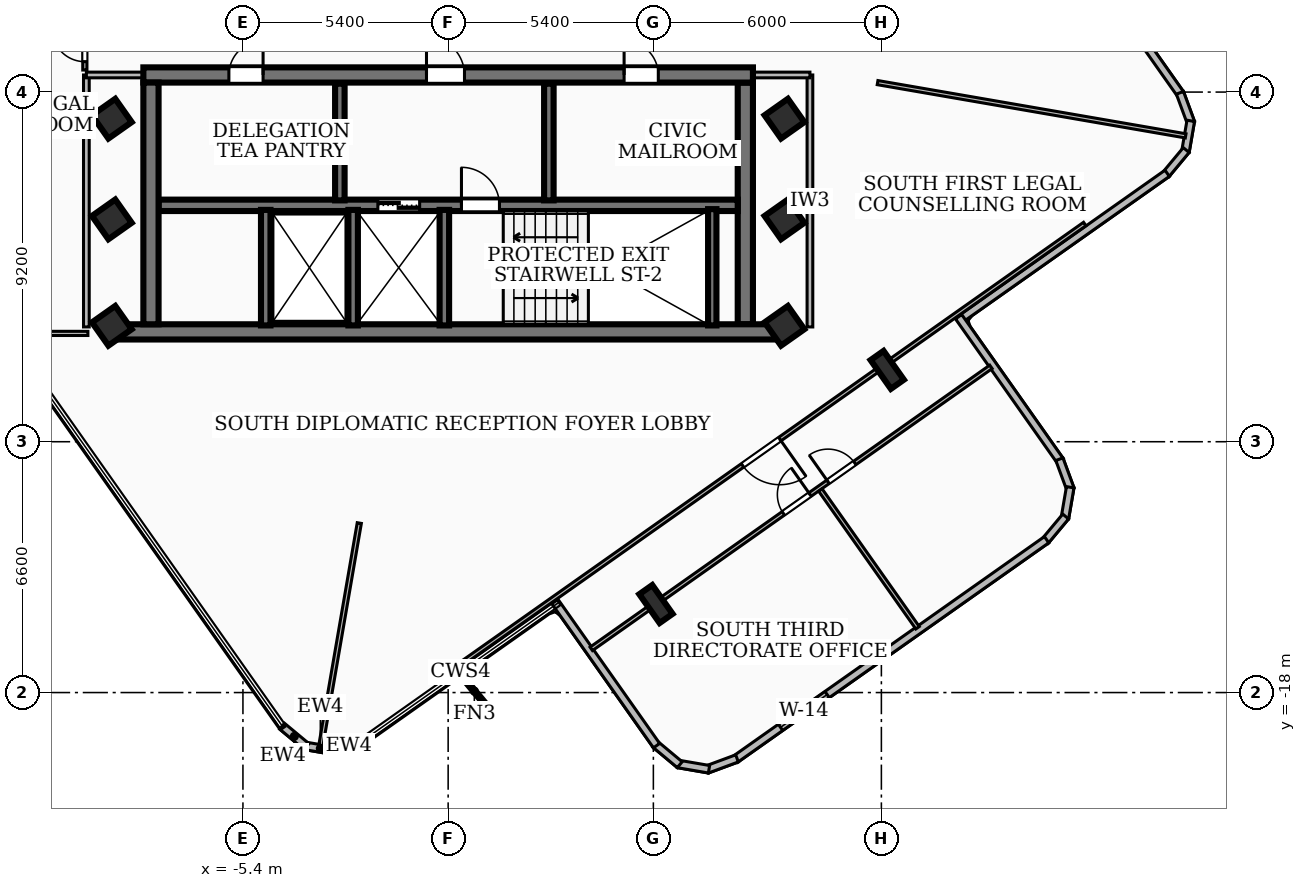
"""IFC4 building model, lengths in metres.
Left out: names, types, materials, properties, quantities, classifications, styles, units other than length and angle.
Written with IfcOpenShell. Run it as: python <this file> out.ifc"""

import sys

from ifc_helpers import new_model, si_unit, direction, frame, frame_2d, origin, origin_2d, place, context, subcontext, project, spatial, rectangle, i_section, extrude, element, fill, save


model = new_model("IFC4")
c1 = context("Model", 3, precision=1e-05, world=origin(), true_north=direction((0.0, 1.0)))
c2 = subcontext(c1, "Body", "Model", "MODEL_VIEW")
j1 = project(units=[si_unit("LENGTHUNIT", "METRE"), si_unit("PLANEANGLEUNIT", "RADIAN")], contexts=[c1])
p1 = place(None, origin())
s1 = spatial("IfcSite", under=j1, at=p1, CompositionType="ELEMENT")
p2 = place(p1, origin())
s2 = spatial("IfcBuilding", under=s1, at=p2, CompositionType="ELEMENT")
p3 = place(p2, frame((0.0, 0.0, 222.3)))
s3 = spatial("IfcBuildingStorey", under=s2, at=p3, CompositionType="ELEMENT", Elevation=222.3)
p4 = place(p3, frame((8.78, -8.51, 0.0), z_axis=(0.0, 0.0, 1.0), x_axis=(-1.0, 0.0, 0.0)))
e1 = element("IfcWall", 1, at=p4, inside=s3, PredefinedType="SHEAR", context=c2, shape_type="SweptSolid", body=[
    extrude(rectangle(XDim=17.56, YDim=0.4, at=frame_2d((8.78, 0.0))), origin(), (0.0, 0.0, 1.0), 3.14),
])
p5 = place(p3, frame((-8.02, -1.75, 0.0), z_axis=(0.0, 0.0, 1.0), x_axis=(1.0, 0.0, 0.0)))
e2 = element("IfcWall", 2, at=p5, inside=s3, PredefinedType="SHEAR", context=c2, shape_type="SweptSolid", body=[
    extrude(rectangle(XDim=16.04, YDim=0.4, at=frame_2d((8.02, 0.0))), origin(), (0.0, 0.0, 1.0), 3.14),
])
p6 = place(p5, frame((7.45, 0.0, 0.0)))
e3 = element("IfcOpeningElement", 3, at=p6, cuts=e2, PredefinedType="OPENING", context=c2, shape_type="SweptSolid", body=[
    extrude(rectangle(XDim=1.0, YDim=2.1, at=frame_2d((0.5, 1.05))), frame((0.0, 0.21, 0.0), z_axis=(0.0, -1.0, 0.0), x_axis=(1.0, 0.0, 0.0)), (0.0, 0.0, 1.0), 0.42),
])
p7 = place(p5, frame((12.65, 0.0, 0.0)))
e4 = element("IfcOpeningElement", 4, at=p7, cuts=e2, PredefinedType="OPENING", context=c2, shape_type="SweptSolid", body=[
    extrude(rectangle(XDim=0.9, YDim=2.06, at=frame_2d((0.45, 1.03))), frame((0.0, 0.21, 0.0), z_axis=(0.0, -1.0, 0.0), x_axis=(1.0, 0.0, 0.0)), (0.0, 0.0, 1.0), 0.42),
])
p8 = place(p5, frame((2.25, 0.0, 0.0)))
e5 = element("IfcOpeningElement", 5, at=p8, cuts=e2, PredefinedType="OPENING", context=c2, shape_type="SweptSolid", body=[
    extrude(rectangle(XDim=0.9, YDim=2.06, at=frame_2d((0.45, 1.03))), frame((0.0, 0.21, 0.0), z_axis=(0.0, -1.0, 0.0), x_axis=(1.0, 0.0, 0.0)), (0.0, 0.0, 1.0), 0.42),
])
for number, where, z_axis, x_axis in (
    (6, (-7.82, -8.31, 0.0), (0.0, 0.0, 1.0), (0.0, 1.0, 0.0)),
    (7, (7.82, -1.95, 0.0), (0.0, 0.0, 1.0), (0.0, -1.0, 0.0)),
):
    element("IfcWall", number, at=place(p3, frame(where, z_axis=z_axis, x_axis=x_axis)), inside=s3, PredefinedType="SHEAR", context=c2, shape_type="SweptSolid", body=[
        extrude(rectangle(XDim=6.36, YDim=0.4, at=frame_2d((3.18, 0.0))), origin(), (0.0, 0.0, 1.0), 3.14),
    ])
p9 = place(p3, frame((-7.62, -5.18, 0.0), z_axis=(0.0, 0.0, 1.0), x_axis=(1.0, 0.0, 0.0)))
e8 = element("IfcWall", 8, at=p9, inside=s3, PredefinedType="SOLIDWALL", context=c2, shape_type="SweptSolid", body=[
    extrude(rectangle(XDim=15.24, YDim=0.3, at=frame_2d((7.62, 0.0))), origin(), (0.0, 0.0, 1.0), 3.14),
])
p10 = place(p9, frame((5.77, 0.0, 0.0)))
e9 = element("IfcOpeningElement", 9, at=p10, cuts=e8, PredefinedType="OPENING", context=c2, shape_type="SweptSolid", body=[
    extrude(rectangle(XDim=1.1, YDim=2.15, at=frame_2d((0.55, 1.075))), frame((0.0, 0.16, 0.0), z_axis=(0.0, -1.0, 0.0), x_axis=(1.0, 0.0, 0.0)), (0.0, 0.0, 1.0), 0.32),
])
p11 = place(p9, frame((7.97, 0.0, 0.0)))
e10 = element("IfcOpeningElement", 10, at=p11, cuts=e8, PredefinedType="OPENING", context=c2, shape_type="SweptSolid", body=[
    extrude(rectangle(XDim=1.0, YDim=2.1, at=frame_2d((0.5, 1.05))), frame((0.0, 0.16, 0.0), z_axis=(0.0, -1.0, 0.0), x_axis=(1.0, 0.0, 0.0)), (0.0, 0.0, 1.0), 0.32),
])
p12 = place(p3, frame((6.95, -8.34, 0.0), z_axis=(0.0, 0.0, 1.0), x_axis=(0.0, 1.0, 0.0)))
e11 = element("IfcWall", 11, at=p12, inside=s3, PredefinedType="SOLIDWALL", context=c2, shape_type="SweptSolid", body=[
    extrude(rectangle(XDim=3.06, YDim=0.22, at=frame_2d((1.53, 0.0))), origin(), (0.0, 0.0, 1.0), 3.14),
])
for number, where, z_axis, x_axis in (
    (12, (-0.1, -8.34, 0.0), (0.0, 0.0, 1.0), (0.0, 1.0, 0.0)),
    (13, (-2.5, -8.34, 0.0), (0.0, 0.0, 1.0), (0.0, 1.0, 0.0)),
    (14, (-4.8, -8.34, 0.0), (0.0, 0.0, 1.0), (0.0, 1.0, 0.0)),
):
    element("IfcWall", number, at=place(p3, frame(where, z_axis=z_axis, x_axis=x_axis)), inside=s3, PredefinedType="SOLIDWALL", context=c2, shape_type="SweptSolid", body=[
        extrude(rectangle(XDim=3.04, YDim=0.25, at=frame_2d((1.52, 0.0))), origin(), (0.0, 0.0, 1.0), 3.14),
    ])
for number, where, z_axis, x_axis in (
    (15, (-2.85, -5.05, 0.0), (0.0, 0.0, 1.0), (0.0, 1.0, 0.0)),
    (16, (2.65, -5.05, 0.0), (0.0, 0.0, 1.0), (0.0, 1.0, 0.0)),
):
    element("IfcWall", number, at=place(p3, frame(where, z_axis=z_axis, x_axis=x_axis)), inside=s3, PredefinedType="SOLIDWALL", context=c2, shape_type="SweptSolid", body=[
        extrude(rectangle(XDim=3.07, YDim=0.25, at=frame_2d((1.535, 0.0))), origin(), (0.0, 0.0, 1.0), 3.14),
    ])
for number, where, z_axis, x_axis in (
    (17, (-8.85, -5.55, 0.0), (0.0, 0.0, 1.0), (0.817, 0.576, 0.0)),
    (18, (-8.85, -2.9, 0.0), (0.0, 0.0, 1.0), (0.817, 0.576, 0.0)),
    (19, (8.85, -5.55, 0.0), (0.0, 0.0, 1.0), (0.817, 0.576, 0.0)),
    (20, (8.85, -2.9, 0.0), (0.0, 0.0, 1.0), (0.817, 0.576, 0.0)),
    (21, (8.85, -8.35, 0.0), (0.0, 0.0, 1.0), (0.817, 0.576, 0.0)),
    (22, (-8.85, -8.35, 0.0), (0.0, 0.0, 1.0), (0.817, 0.576, 0.0)),
):
    element("IfcColumn", number, at=place(p3, frame(where, z_axis=z_axis, x_axis=x_axis)), inside=s3, PredefinedType="COLUMN", context=c2, shape_type="SweptSolid", body=[
        extrude(rectangle(XDim=0.75, YDim=0.75, at=origin_2d()), origin(), (0.0, 0.0, 1.0), 3.42),
    ])
for number, where, z_axis, x_axis in (
    (23, (5.468, -15.671, 0.0), (0.0, 0.0, 1.0), (0.817, 0.576, 0.0)),
    (24, (11.554, -9.51, 0.0), (0.0, 0.0, 1.0), (0.817, 0.576, 0.0)),
):
    element("IfcColumn", number, at=place(p3, frame(where, z_axis=z_axis, x_axis=x_axis)), inside=s3, PredefinedType="COLUMN", context=c2, shape_type="SweptSolid", body=[
        extrude(i_section(OverallWidth=0.418, OverallDepth=0.927, WebThickness=0.019, FlangeThickness=0.032, at=origin_2d()), origin(), (0.0, 0.0, 1.0), 3.42),
    ])
p13 = place(p3, frame((-2.219, -19.256, 0.0), z_axis=(0.0, 0.0, 1.0), x_axis=(-0.938243551417, -0.345975487894, 0.0)))
e25 = element("IfcWall", 25, at=p13, inside=s3, PredefinedType="SOLIDWALL", context=c2, shape_type="SweptSolid", body=[
    extrude(rectangle(XDim=0.838, YDim=0.2, at=frame_2d((0.419, 0.0))), origin(), (0.0, 0.0, 1.0), 3.14),
])
p14 = place(p3, frame((-2.957, -19.541, 0.0), z_axis=(0.0, 0.0, 1.0), x_axis=(-0.985466949497, 0.169867275979, 0.0)))
e26 = element("IfcWall", 26, at=p14, inside=s3, PredefinedType="SOLIDWALL", context=c2, shape_type="SweptSolid", body=[
    extrude(rectangle(XDim=0.825, YDim=0.2, at=frame_2d((0.413, 0.0))), origin(), (0.0, 0.0, 1.0), 3.14),
])
p15 = place(p3, frame((-3.726, -19.421, 0.0), z_axis=(0.0, 0.0, 1.0), x_axis=(-0.768698761673, 0.639610986305, 0.0)))
e27 = element("IfcWall", 27, at=p15, inside=s3, PredefinedType="SOLIDWALL", context=c2, shape_type="SweptSolid", body=[
    extrude(rectangle(XDim=0.838, YDim=0.2, at=frame_2d((0.419, 0.0))), origin(), (0.0, 0.0, 1.0), 3.14),
])
p16 = place(p3, frame((15.623, 2.919, 0.0), z_axis=(0.0, 0.0, 1.0), x_axis=(0.576566796686, -0.817050016192, 0.0)))
e28 = element("IfcWall", 28, at=p16, inside=s3, PredefinedType="SOLIDWALL", context=c2, shape_type="SweptSolid", body=[
    extrude(rectangle(XDim=6.341, YDim=0.2, at=frame_2d((3.17, 0.0))), origin(), (0.0, 0.0, 1.0), 3.14),
])
p17 = place(p3, frame((19.256, -2.219, 0.0), z_axis=(0.0, 0.0, 1.0), x_axis=(0.345975487894, -0.938243551417, 0.0)))
e29 = element("IfcWall", 29, at=p17, inside=s3, PredefinedType="SOLIDWALL", context=c2, shape_type="SweptSolid", body=[
    extrude(rectangle(XDim=0.838, YDim=0.2, at=frame_2d((0.419, 0.0))), origin(), (0.0, 0.0, 1.0), 3.14),
])
p18 = place(p3, frame((19.541, -2.957, 0.0), z_axis=(0.0, 0.0, 1.0), x_axis=(-0.169867275979, -0.985466949497, 0.0)))
e30 = element("IfcWall", 30, at=p18, inside=s3, PredefinedType="SOLIDWALL", context=c2, shape_type="SweptSolid", body=[
    extrude(rectangle(XDim=0.825, YDim=0.2, at=frame_2d((0.413, 0.0))), origin(), (0.0, 0.0, 1.0), 3.14),
])
p19 = place(p3, frame((19.421, -3.726, 0.0), z_axis=(0.0, 0.0, 1.0), x_axis=(-0.639610986305, -0.768698761673, 0.0)))
e31 = element("IfcWall", 31, at=p19, inside=s3, PredefinedType="SOLIDWALL", context=c2, shape_type="SweptSolid", body=[
    extrude(rectangle(XDim=0.838, YDim=0.2, at=frame_2d((0.419, 0.0))), origin(), (0.0, 0.0, 1.0), 3.14),
])
p20 = place(p3, frame((18.921, -4.337, 0.0), z_axis=(0.0, 0.0, 1.0), x_axis=(-0.817167578816, -0.576400163196, 0.0)))
e32 = element("IfcWall", 32, at=p20, inside=s3, PredefinedType="SOLIDWALL", context=c2, shape_type="SweptSolid", body=[
    extrude(rectangle(XDim=6.74, YDim=0.2, at=frame_2d((3.37, 0.0))), origin(), (0.0, 0.0, 1.0), 3.14),
])
p21 = place(p3, frame((13.432, -8.111, 0.0), z_axis=(0.0, 0.0, 1.0), x_axis=(0.576445639344, -0.817135499707, 0.0)))
e33 = element("IfcWall", 33, at=p21, inside=s3, PredefinedType="SOLIDWALL", context=c2, shape_type="SweptSolid", body=[
    extrude(rectangle(XDim=4.641, YDim=0.2, at=frame_2d((2.32, 0.0))), origin(), (0.0, 0.0, 1.0), 3.14),
])
p22 = place(p3, frame((16.084, -11.86, 0.0), z_axis=(0.0, 0.0, 1.0), x_axis=(0.346232030844, -0.938148911857, 0.0)))
e34 = element("IfcWall", 34, at=p22, inside=s3, PredefinedType="SOLIDWALL", context=c2, shape_type="SweptSolid", body=[
    extrude(rectangle(XDim=0.838, YDim=0.2, at=frame_2d((0.419, 0.0))), origin(), (0.0, 0.0, 1.0), 3.14),
])
p23 = place(p3, frame((16.369, -12.598, 0.0), z_axis=(0.0, 0.0, 1.0), x_axis=(-0.169332910212, -0.985558910223, 0.0)))
e35 = element("IfcWall", 35, at=p23, inside=s3, PredefinedType="SOLIDWALL", context=c2, shape_type="SweptSolid", body=[
    extrude(rectangle(XDim=0.826, YDim=0.2, at=frame_2d((0.413, 0.0))), origin(), (0.0, 0.0, 1.0), 3.14),
])
p24 = place(p3, frame((16.249, -13.368, 0.0), z_axis=(0.0, 0.0, 1.0), x_axis=(-0.641043819012, -0.76750428149, 0.0)))
e36 = element("IfcWall", 36, at=p24, inside=s3, PredefinedType="SOLIDWALL", context=c2, shape_type="SweptSolid", body=[
    extrude(rectangle(XDim=0.838, YDim=0.2, at=frame_2d((0.419, 0.0))), origin(), (0.0, 0.0, 1.0), 3.14),
])
p25 = place(p3, frame((15.748, -13.978, 0.0), z_axis=(0.0, 0.0, 1.0), x_axis=(-0.817168991675, -0.576398160168, 0.0)))
e37 = element("IfcWall", 37, at=p25, inside=s3, PredefinedType="SOLIDWALL", context=c2, shape_type="SweptSolid", body=[
    extrude(rectangle(XDim=10.022, YDim=0.2, at=frame_2d((5.011, 0.0))), origin(), (0.0, 0.0, 1.0), 3.14),
])
p26 = place(p25, frame((7.068, 0.0, 0.85)))
e38 = element("IfcOpeningElement", 38, at=p26, cuts=e37, PredefinedType="OPENING", context=c2, shape_type="SweptSolid", body=[
    extrude(rectangle(XDim=1.5, YDim=1.5, at=frame_2d((0.75, 0.75))), frame((0.0, 0.11, 0.0), z_axis=(0.0, -1.0, 0.0), x_axis=(1.0, 0.0, 0.0)), (0.0, 0.0, 1.0), 0.22),
])
p27 = place(p3, frame((7.601, -19.732, 0.0), z_axis=(0.0, 0.0, 1.0), x_axis=(-0.937664324164, -0.347542249504, 0.0)))
e39 = element("IfcWall", 39, at=p27, inside=s3, PredefinedType="SOLIDWALL", context=c2, shape_type="SweptSolid", body=[
    extrude(rectangle(XDim=0.837, YDim=0.2, at=frame_2d((0.419, 0.0))), origin(), (0.0, 0.0, 1.0), 3.14),
])
p28 = place(p3, frame((6.864, -20.018, 0.0), z_axis=(0.0, 0.0, 1.0), x_axis=(-0.985501046628, 0.16966934636, 0.0)))
e40 = element("IfcWall", 40, at=p28, inside=s3, PredefinedType="SOLIDWALL", context=c2, shape_type="SweptSolid", body=[
    extrude(rectangle(XDim=0.826, YDim=0.2, at=frame_2d((0.413, 0.0))), origin(), (0.0, 0.0, 1.0), 3.14),
])
p29 = place(p3, frame((6.094, -19.898, 0.0), z_axis=(0.0, 0.0, 1.0), x_axis=(-0.767647650908, 0.640872127694, 0.0)))
e41 = element("IfcWall", 41, at=p29, inside=s3, PredefinedType="SOLIDWALL", context=c2, shape_type="SweptSolid", body=[
    extrude(rectangle(XDim=0.838, YDim=0.2, at=frame_2d((0.419, 0.0))), origin(), (0.0, 0.0, 1.0), 3.14),
])
p30 = place(p3, frame((5.484, -19.397, 0.0), z_axis=(0.0, 0.0, 1.0), x_axis=(-0.576451897958, 0.817131084551, 0.0)))
e42 = element("IfcWall", 42, at=p30, inside=s3, PredefinedType="SOLIDWALL", context=c2, shape_type="SweptSolid", body=[
    extrude(rectangle(XDim=4.642, YDim=0.2, at=frame_2d((2.321, 0.0))), origin(), (0.0, 0.0, 1.0), 3.14),
])
p31 = place(p3, frame((-9.52, -8.38, 0.0), z_axis=(0.0, 0.0, 1.0), x_axis=(0.0, 1.0, 0.0)))
e43 = element("IfcWall", 43, at=p31, inside=s3, PredefinedType="PARTITIONING", context=c2, shape_type="SweptSolid", body=[
    extrude(rectangle(XDim=6.63, YDim=0.15, at=frame_2d((3.315, 0.0))), origin(), (0.0, 0.0, 1.0), 3.14),
])
p32 = place(p3, frame((-7.85, -1.75, 0.0), z_axis=(0.0, 0.0, 1.0), x_axis=(-1.0, 0.0, 0.0)))
e44 = element("IfcWall", 44, at=p32, inside=s3, PredefinedType="PARTITIONING", context=c2, shape_type="SweptSolid", body=[
    extrude(rectangle(XDim=1.67, YDim=0.15, at=frame_2d((0.835, 0.0))), origin(), (0.0, 0.0, 1.0), 2.37),
])
p33 = place(p3, frame((9.52, -8.38, 0.0), z_axis=(0.0, 0.0, 1.0), x_axis=(0.0, 1.0, 0.0)))
e45 = element("IfcWall", 45, at=p33, inside=s3, PredefinedType="PARTITIONING", context=c2, shape_type="SweptSolid", body=[
    extrude(rectangle(XDim=6.63, YDim=0.15, at=frame_2d((3.315, 0.0))), origin(), (0.0, 0.0, 1.0), 3.14),
])
p34 = place(p3, frame((7.85, -1.75, 0.0), z_axis=(0.0, 0.0, 1.0), x_axis=(1.0, 0.0, 0.0)))
e46 = element("IfcWall", 46, at=p34, inside=s3, PredefinedType="PARTITIONING", context=c2, shape_type="SweptSolid", body=[
    extrude(rectangle(XDim=1.67, YDim=0.15, at=frame_2d((0.835, 0.0))), origin(), (0.0, 0.0, 1.0), 2.37),
])
p35 = place(p3, frame((-11.573, -8.55, 0.0), z_axis=(0.0, 0.0, 1.0), x_axis=(1.0, 0.0, 0.0)))
e47 = element("IfcWall", 47, at=p35, inside=s3, PredefinedType="PARTITIONING", context=c2, shape_type="SweptSolid", body=[
    extrude(rectangle(XDim=2.093, YDim=0.11, at=frame_2d((1.046, 0.0))), origin(), (0.0, 0.0, 1.0), 3.14),
])
p36 = place(p3, frame((-9.56, -1.62, 0.0), z_axis=(0.0, 0.0, 1.0), x_axis=(0.0, 1.0, 0.0)))
e48 = element("IfcWall", 48, at=p36, inside=s3, PredefinedType="PARTITIONING", context=c2, shape_type="SweptSolid", body=[
    extrude(rectangle(XDim=3.24, YDim=0.11, at=frame_2d((1.62, 0.0))), origin(), (0.0, 0.0, 1.0), 3.14),
])
p37 = place(p36, frame((0.22, 0.0, 0.0)))
e49 = element("IfcOpeningElement", 49, at=p37, cuts=e48, PredefinedType="OPENING", context=c2, shape_type="SweptSolid", body=[
    extrude(rectangle(XDim=0.86, YDim=2.04, at=frame_2d((0.43, 1.02))), frame((0.0, 0.065, 0.0), z_axis=(0.0, -1.0, 0.0), x_axis=(1.0, 0.0, 0.0)), (0.0, 0.0, 1.0), 0.13),
])
p38 = place(p36, frame((2.16, 0.0, 0.0)))
e50 = element("IfcOpeningElement", 50, at=p38, cuts=e48, PredefinedType="OPENING", context=c2, shape_type="SweptSolid", body=[
    extrude(rectangle(XDim=0.86, YDim=2.04, at=frame_2d((0.43, 1.02))), frame((0.0, 0.065, 0.0), z_axis=(0.0, -1.0, 0.0), x_axis=(1.0, 0.0, 0.0)), (0.0, 0.0, 1.0), 0.13),
])
p39 = place(p3, frame((-2.338, -13.54, 0.0), z_axis=(0.0, 0.0, 1.0), x_axis=(-0.1703339471, -0.9853863945, 0.0)))
e51 = element("IfcWall", 51, at=p39, inside=s3, PredefinedType="PARTITIONING", context=c2, shape_type="SweptSolid", body=[
    extrude(rectangle(XDim=5.954, YDim=0.11, at=frame_2d((2.977, 0.0))), origin(), (0.0, 0.0, 1.0), 3.14),
])
p40 = place(p3, frame((11.3, -1.951, 0.0), z_axis=(0.0, 0.0, 1.0), x_axis=(0.985391330126, -0.170305391905, 0.0)))
e52 = element("IfcWall", 52, at=p40, inside=s3, PredefinedType="PARTITIONING", context=c2, shape_type="SweptSolid", body=[
    extrude(rectangle(XDim=8.227, YDim=0.11, at=frame_2d((4.114, 0.0))), origin(), (0.0, 0.0, 1.0), 3.14),
])
p41 = place(p3, frame((16.752, -5.671, 0.0), z_axis=(0.0, 0.0, 1.0), x_axis=(-0.81715881447, -0.576412588285, 0.0)))
e53 = element("IfcWall", 53, at=p41, inside=s3, PredefinedType="PARTITIONING", context=c2, shape_type="SweptSolid", body=[
    extrude(rectangle(XDim=20.44, YDim=0.11, at=frame_2d((10.22, 0.0))), origin(), (0.0, 0.0, 1.0), 2.51),
])
p42 = place(p41, frame((9.82, 0.0, 0.0)))
e54 = element("IfcOpeningElement", 54, at=p42, cuts=e53, PredefinedType="OPENING", context=c2, shape_type="SweptSolid", body=[
    extrude(rectangle(XDim=1.2, YDim=2.1, at=frame_2d((0.6, 1.05))), frame((0.0, 0.065, 0.0), z_axis=(0.0, -1.0, 0.0), x_axis=(1.0, 0.0, 0.0)), (0.0, 0.0, 1.0), 0.13),
])
p43 = place(p3, frame((9.795, -12.671, 0.0), z_axis=(0.0, 0.0, 1.0), x_axis=(0.576531911777, -0.817074632272, 0.0)))
e55 = element("IfcWall", 55, at=p43, inside=s3, PredefinedType="PARTITIONING", context=c2, shape_type="SweptSolid", body=[
    extrude(rectangle(XDim=4.435, YDim=0.11, at=frame_2d((2.218, 0.0))), origin(), (0.0, 0.0, 1.0), 3.14),
])
p44 = place(p3, frame((3.766, -16.85, 0.0), z_axis=(0.0, 0.0, 1.0), x_axis=(0.817131323803, 0.576451558815, 0.0)))
e56 = element("IfcWall", 56, at=p44, inside=s3, PredefinedType="PARTITIONING", context=c2, shape_type="SweptSolid", body=[
    extrude(rectangle(XDim=12.87, YDim=0.11, at=frame_2d((6.435, 0.0))), origin(), (0.0, 0.0, 1.0), 2.51),
])
p45 = place(p44, frame((6.185, 0.0, 0.0)))
e57 = element("IfcOpeningElement", 57, at=p45, cuts=e56, PredefinedType="OPENING", context=c2, shape_type="SweptSolid", body=[
    extrude(rectangle(XDim=0.86, YDim=2.04, at=frame_2d((0.43, 1.02))), frame((0.0, 0.065, 0.0), z_axis=(0.0, -1.0, 0.0), x_axis=(1.0, 0.0, 0.0)), (0.0, 0.0, 1.0), 0.13),
])
p46 = place(p44, frame((7.625, 0.0, 0.0)))
e58 = element("IfcOpeningElement", 58, at=p46, cuts=e56, PredefinedType="OPENING", context=c2, shape_type="SweptSolid", body=[
    extrude(rectangle(XDim=0.86, YDim=2.04, at=frame_2d((0.43, 1.02))), frame((0.0, 0.065, 0.0), z_axis=(0.0, -1.0, 0.0), x_axis=(1.0, 0.0, 0.0)), (0.0, 0.0, 1.0), 0.13),
])
p47 = place(p26, origin())
e59 = element("IfcWindow", 59, at=p47, inside=s3, PartitioningType="SINGLE_PANEL", PredefinedType="WINDOW", context=c2, shape_type="SweptSolid", body=[
    extrude(rectangle(XDim=1.5, YDim=1.5, at=frame_2d((0.75, 0.75))), frame((0.0, 0.03, 0.0), z_axis=(0.0, -1.0, 0.0), x_axis=(1.0, 0.0, 0.0)), (0.0, 0.0, 1.0), 0.06),
])
fill(e38, e59)
p48 = place(p6, origin())
e60 = element("IfcDoor", 60, at=p48, inside=s3, OperationType="SINGLE_SWING_LEFT", PredefinedType="DOOR", context=c2, shape_type="SweptSolid", body=[
    extrude(rectangle(XDim=1.0, YDim=2.1, at=frame_2d((0.5, 1.05))), frame((0.0, 0.025, 0.0), z_axis=(0.0, -1.0, 0.0), x_axis=(1.0, 0.0, 0.0)), (0.0, 0.0, 1.0), 0.05),
])
fill(e3, e60)
p49 = place(p10, origin())
e61 = element("IfcDoor", 61, at=p49, inside=s3, OperationType="DOUBLE_DOOR_SLIDING", PredefinedType="DOOR", context=c2, shape_type="SweptSolid", body=[
    extrude(rectangle(XDim=1.1, YDim=2.15, at=frame_2d((0.55, 1.075))), frame((0.0, 0.025, 0.0), z_axis=(0.0, -1.0, 0.0), x_axis=(1.0, 0.0, 0.0)), (0.0, 0.0, 1.0), 0.05),
])
fill(e9, e61)
p50 = place(p11, origin())
e62 = element("IfcDoor", 62, at=p50, inside=s3, OperationType="SINGLE_SWING_LEFT", PredefinedType="DOOR", context=c2, shape_type="SweptSolid", body=[
    extrude(rectangle(XDim=1.0, YDim=2.1, at=frame_2d((0.5, 1.05))), frame((0.0, 0.025, 0.0), z_axis=(0.0, -1.0, 0.0), x_axis=(1.0, 0.0, 0.0)), (0.0, 0.0, 1.0), 0.05),
])
fill(e10, e62)
p51 = place(p7, origin())
e63 = element("IfcDoor", 63, at=p51, inside=s3, OperationType="SINGLE_SWING_LEFT", PredefinedType="DOOR", context=c2, shape_type="SweptSolid", body=[
    extrude(rectangle(XDim=0.9, YDim=2.06, at=frame_2d((0.45, 1.03))), frame((0.0, 0.025, 0.0), z_axis=(0.0, -1.0, 0.0), x_axis=(1.0, 0.0, 0.0)), (0.0, 0.0, 1.0), 0.05),
])
fill(e4, e63)
p52 = place(p8, origin())
e64 = element("IfcDoor", 64, at=p52, inside=s3, OperationType="SINGLE_SWING_RIGHT", PredefinedType="DOOR", context=c2, shape_type="SweptSolid", body=[
    extrude(rectangle(XDim=0.9, YDim=2.06, at=frame_2d((0.45, 1.03))), frame((0.0, 0.025, 0.0), z_axis=(0.0, -1.0, 0.0), x_axis=(1.0, 0.0, 0.0)), (0.0, 0.0, 1.0), 0.05),
])
fill(e5, e64)
p53 = place(p37, origin())
e65 = element("IfcDoor", 65, at=p53, inside=s3, OperationType="SINGLE_SWING_RIGHT", PredefinedType="DOOR", context=c2, shape_type="SweptSolid", body=[
    extrude(rectangle(XDim=0.86, YDim=2.04, at=frame_2d((0.43, 1.02))), frame((0.0, 0.025, 0.0), z_axis=(0.0, -1.0, 0.0), x_axis=(1.0, 0.0, 0.0)), (0.0, 0.0, 1.0), 0.05),
])
fill(e49, e65)
p54 = place(p42, origin())
e66 = element("IfcDoor", 66, at=p54, inside=s3, OperationType="SINGLE_SWING_LEFT", PredefinedType="DOOR", context=c2, shape_type="SweptSolid", body=[
    extrude(rectangle(XDim=1.2, YDim=2.1, at=frame_2d((0.6, 1.05))), frame((0.0, 0.025, 0.0), z_axis=(0.0, -1.0, 0.0), x_axis=(1.0, 0.0, 0.0)), (0.0, 0.0, 1.0), 0.05),
])
fill(e54, e66)
p55 = place(p45, origin())
e67 = element("IfcDoor", 67, at=p55, inside=s3, OperationType="SINGLE_SWING_RIGHT", PredefinedType="DOOR", context=c2, shape_type="SweptSolid", body=[
    extrude(rectangle(XDim=0.86, YDim=2.04, at=frame_2d((0.43, 1.02))), frame((0.0, 0.025, 0.0), z_axis=(0.0, -1.0, 0.0), x_axis=(1.0, 0.0, 0.0)), (0.0, 0.0, 1.0), 0.05),
])
fill(e57, e67)
p56 = place(p46, origin())
e68 = element("IfcDoor", 68, at=p56, inside=s3, OperationType="SINGLE_SWING_LEFT", PredefinedType="DOOR", context=c2, shape_type="SweptSolid", body=[
    extrude(rectangle(XDim=0.86, YDim=2.04, at=frame_2d((0.43, 1.02))), frame((0.0, 0.025, 0.0), z_axis=(0.0, -1.0, 0.0), x_axis=(1.0, 0.0, 0.0)), (0.0, 0.0, 1.0), 0.05),
])
fill(e58, e68)
save(model, sys.argv[1])
